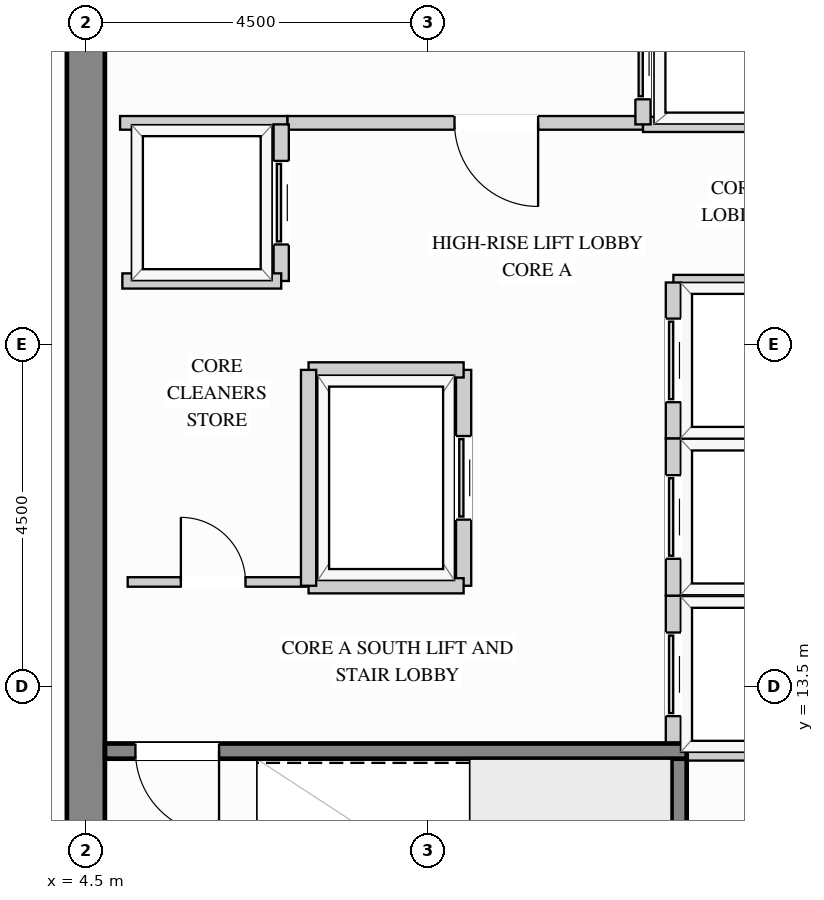
"""IFC4 building model, lengths in metres.
Left out: names, types, materials, properties, quantities, classifications, styles, units other than length and angle.
Written with IfcOpenShell. Run it as: python <this file> out.ifc"""

import sys

from ifc_helpers import new_model, si_unit, direction, frame, frame_2d, origin, place, context, subcontext, project, spatial, rectangle, extrude, source, transform, mapped, element, fill, save


model = new_model("IFC4")
c1 = context("Model", 3, precision=1e-05, world=origin(), true_north=direction((0.0, 1.0)))
c2 = subcontext(c1, "Body", "Model", "MODEL_VIEW")
j1 = project(units=[si_unit("LENGTHUNIT", "METRE"), si_unit("PLANEANGLEUNIT", "RADIAN")], contexts=[c1])
p1 = place(None, origin())
s1 = spatial("IfcSite", under=j1, at=p1, CompositionType="ELEMENT")
p2 = place(p1, origin())
s2 = spatial("IfcBuilding", under=s1, at=p2, CompositionType="ELEMENT")
p3 = place(p2, frame((0.0, 0.0, 223.2)))
s3 = spatial("IfcBuildingStorey", under=s2, at=p3, CompositionType="ELEMENT", Elevation=223.2)
m1 = source(origin(), c2, "Body", "SweptSolid", [
    extrude(rectangle(XDim=20.5, YDim=0.5, at=frame_2d((10.25, 0.0))), origin(), (0.0, 0.0, 1.0), 3.4),
])
p4 = place(p3, frame((4.5, 8.75, 0.0), z_axis=(0.0, 0.0, 1.0), x_axis=(0.0, 1.0, 0.0)))
e1 = element("IfcWall", 1, at=p4, inside=s3, PredefinedType="SHEAR", context=c2, shape_type="MappedRepresentation", body=[
    mapped(m1, transform((0.0, 0.0, 0.0), x_axis=(1.0, 0.0, 0.0), y_axis=(0.0, 1.0, 0.0), z_axis=(0.0, 0.0, 1.0))),
])
p5 = place(p3, frame((7.15, 20.92, 0.0), z_axis=(0.0, 0.0, 1.0), x_axis=(1.0, 0.0, 0.0)))
e2 = element("IfcWall", 2, at=p5, inside=s3, PredefinedType="PARTITIONING", context=c2, shape_type="SweptSolid", body=[
    extrude(rectangle(XDim=4.68, YDim=0.18, at=frame_2d((2.34, 0.0))), origin(), (0.0, 0.0, 1.0), 3.385),
])
p6 = place(p5, frame((2.2, 0.0, 0.0)))
e3 = element("IfcOpeningElement", 3, at=p6, cuts=e2, PredefinedType="OPENING", context=c2, shape_type="SweptSolid", body=[
    extrude(rectangle(XDim=1.1, YDim=2.15, at=frame_2d((0.55, 1.075))), frame((0.0, 0.1, 0.0), z_axis=(0.0, -1.0, 0.0), x_axis=(1.0, 0.0, 0.0)), (0.0, 0.0, 1.0), 0.2),
])
m2 = source(origin(), c2, "Body", "SweptSolid", [
    extrude(rectangle(XDim=2.2, YDim=0.18, at=frame_2d((1.1, 0.0))), origin(), (0.0, 0.0, 1.0), 3.385),
])
p7 = place(p3, frame((4.95, 20.92, 0.0), z_axis=(0.0, 0.0, 1.0), x_axis=(1.0, 0.0, 0.0)))
e4 = element("IfcWall", 4, at=p7, inside=s3, PredefinedType="PARTITIONING", context=c2, shape_type="MappedRepresentation", body=[
    mapped(m2, transform((0.0, 0.0, 0.0), x_axis=(1.0, 0.0, 0.0), y_axis=(0.0, 1.0, 0.0), z_axis=(0.0, 0.0, 1.0))),
])
p8 = place(p3, frame((5.05, 14.88, 0.0), z_axis=(0.0, 0.0, 1.0), x_axis=(1.0, 0.0, 0.0)))
e5 = element("IfcWall", 5, at=p8, inside=s3, PredefinedType="PARTITIONING", context=c2, shape_type="SweptSolid", body=[
    extrude(rectangle(XDim=2.35, YDim=0.125, at=frame_2d((1.175, 0.0))), origin(), (0.0, 0.0, 1.0), 3.385),
])
p9 = place(p8, frame((0.7, 0.0, 0.0)))
e6 = element("IfcOpeningElement", 6, at=p9, cuts=e5, PredefinedType="OPENING", context=c2, shape_type="SweptSolid", body=[
    extrude(rectangle(XDim=0.85, YDim=2.1, at=frame_2d((0.425, 1.05))), frame((0.0, 0.073, 0.0), z_axis=(0.0, -1.0, 0.0), x_axis=(1.0, 0.0, 0.0)), (0.0, 0.0, 1.0), 0.145),
])
m3 = source(origin(), c2, "Body", "SweptSolid", [
    extrude(rectangle(XDim=2.39, YDim=0.2, at=frame_2d((1.195, 0.0))), origin(), (0.0, 0.0, 1.0), 3.385),
])
p10 = place(p3, frame((11.83, 20.9, 0.0), z_axis=(0.0, 0.0, 1.0), x_axis=(1.0, 0.0, 0.0)))
e7 = element("IfcWall", 7, at=p10, inside=s3, PredefinedType="PARTITIONING", context=c2, shape_type="MappedRepresentation", body=[
    mapped(m3, transform((0.0, 0.0, 0.0), x_axis=(1.0, 0.0, 0.0), y_axis=(0.0, 1.0, 0.0), z_axis=(0.0, 0.0, 1.0))),
])
p11 = place(p3, frame((11.83, 20.9, 0.0), z_axis=(0.0, 0.0, 1.0), x_axis=(0.0, 1.0, 0.0)))
e8 = element("IfcWall", 8, at=p11, inside=s3, PredefinedType="PARTITIONING", context=c2, shape_type="SweptSolid", body=[
    extrude(rectangle(XDim=1.76, YDim=0.2, at=frame_2d((0.88, 0.0))), origin(), (0.0, 0.0, 1.0), 3.385),
])
p12 = place(p11, frame((0.33, 0.0, 0.0)))
e9 = element("IfcOpeningElement", 9, at=p12, cuts=e8, PredefinedType="OPENING", context=c2, shape_type="SweptSolid", body=[
    extrude(rectangle(XDim=1.1, YDim=2.2, at=frame_2d((0.55, 1.1))), frame((0.0, 0.11, 0.0), z_axis=(0.0, -1.0, 0.0), x_axis=(1.0, 0.0, 0.0)), (0.0, 0.0, 1.0), 0.22),
])
m4 = source(origin(), c2, "Body", "SweptSolid", [
    extrude(rectangle(XDim=1.99, YDim=0.2, at=frame_2d((0.995, 0.0))), origin(), (0.0, 0.0, 1.0), 3.385),
])
for number, where, z_axis, x_axis in (
    (10, (12.23, 14.7, 0.0), (0.0, 0.0, 1.0), (1.0, 0.0, 0.0)),
    (11, (12.23, 12.63, 0.0), (0.0, 0.0, 1.0), (1.0, 0.0, 0.0)),
):
    element("IfcWall", number, at=place(p3, frame(where, z_axis=z_axis, x_axis=x_axis)), inside=s3, PredefinedType="PARTITIONING", context=c2, shape_type="MappedRepresentation", body=[
        mapped(m4, transform((0.0, 0.0, 0.0), x_axis=(1.0, 0.0, 0.0), y_axis=(0.0, 1.0, 0.0), z_axis=(0.0, 0.0, 1.0))),
    ])
p13 = place(p3, frame((12.23, 12.63, 0.0), z_axis=(0.0, 0.0, 1.0), x_axis=(0.0, 1.0, 0.0)))
e12 = element("IfcWall", 12, at=p13, inside=s3, PredefinedType="PARTITIONING", context=c2, shape_type="SweptSolid", body=[
    extrude(rectangle(XDim=2.07, YDim=0.2, at=frame_2d((1.035, 0.0))), origin(), (0.0, 0.0, 1.0), 3.385),
])
p14 = place(p13, frame((0.485, 0.0, 0.0)))
e13 = element("IfcOpeningElement", 13, at=p14, cuts=e12, PredefinedType="OPENING", context=c2, shape_type="SweptSolid", body=[
    extrude(rectangle(XDim=1.1, YDim=2.2, at=frame_2d((0.55, 1.1))), frame((0.0, 0.11, 0.0), z_axis=(0.0, -1.0, 0.0), x_axis=(1.0, 0.0, 0.0)), (0.0, 0.0, 1.0), 0.22),
])
p15 = place(p3, frame((12.23, 16.77, 0.0), z_axis=(0.0, 0.0, 1.0), x_axis=(1.0, 0.0, 0.0)))
e14 = element("IfcWall", 14, at=p15, inside=s3, PredefinedType="PARTITIONING", context=c2, shape_type="MappedRepresentation", body=[
    mapped(m4, transform((0.0, 0.0, 0.0), x_axis=(1.0, 0.0, 0.0), y_axis=(0.0, 1.0, 0.0), z_axis=(0.0, 0.0, 1.0))),
])
p16 = place(p3, frame((12.23, 14.7, 0.0), z_axis=(0.0, 0.0, 1.0), x_axis=(0.0, 1.0, 0.0)))
e15 = element("IfcWall", 15, at=p16, inside=s3, PredefinedType="PARTITIONING", context=c2, shape_type="SweptSolid", body=[
    extrude(rectangle(XDim=2.07, YDim=0.2, at=frame_2d((1.035, 0.0))), origin(), (0.0, 0.0, 1.0), 3.385),
])
p17 = place(p16, frame((0.485, 0.0, 0.0)))
e16 = element("IfcOpeningElement", 16, at=p17, cuts=e15, PredefinedType="OPENING", context=c2, shape_type="SweptSolid", body=[
    extrude(rectangle(XDim=1.1, YDim=2.2, at=frame_2d((0.55, 1.1))), frame((0.0, 0.11, 0.0), z_axis=(0.0, -1.0, 0.0), x_axis=(1.0, 0.0, 0.0)), (0.0, 0.0, 1.0), 0.22),
])
p18 = place(p3, frame((12.23, 18.82, 0.0), z_axis=(0.0, 0.0, 1.0), x_axis=(1.0, 0.0, 0.0)))
e17 = element("IfcWall", 17, at=p18, inside=s3, PredefinedType="PARTITIONING", context=c2, shape_type="MappedRepresentation", body=[
    mapped(m4, transform((0.0, 0.0, 0.0), x_axis=(1.0, 0.0, 0.0), y_axis=(0.0, 1.0, 0.0), z_axis=(0.0, 0.0, 1.0))),
])
p19 = place(p3, frame((12.23, 16.77, 0.0), z_axis=(0.0, 0.0, 1.0), x_axis=(0.0, 1.0, 0.0)))
e18 = element("IfcWall", 18, at=p19, inside=s3, PredefinedType="PARTITIONING", context=c2, shape_type="SweptSolid", body=[
    extrude(rectangle(XDim=2.05, YDim=0.2, at=frame_2d((1.025, 0.0))), origin(), (0.0, 0.0, 1.0), 3.385),
])
p20 = place(p19, frame((0.475, 0.0, 0.0)))
e19 = element("IfcOpeningElement", 19, at=p20, cuts=e18, PredefinedType="OPENING", context=c2, shape_type="SweptSolid", body=[
    extrude(rectangle(XDim=1.1, YDim=2.2, at=frame_2d((0.55, 1.1))), frame((0.0, 0.11, 0.0), z_axis=(0.0, -1.0, 0.0), x_axis=(1.0, 0.0, 0.0)), (0.0, 0.0, 1.0), 0.22),
])
p21 = place(p3, frame((7.07, 18.84, 0.0), z_axis=(0.0, 0.0, 1.0), x_axis=(0.0, 1.0, 0.0)))
e20 = element("IfcWall", 20, at=p21, inside=s3, PredefinedType="PARTITIONING", context=c2, shape_type="SweptSolid", body=[
    extrude(rectangle(XDim=2.06, YDim=0.2, at=frame_2d((1.03, 0.0))), origin(), (0.0, 0.0, 1.0), 3.385),
])
p22 = place(p21, frame((0.48, 0.0, 0.0)))
e21 = element("IfcOpeningElement", 21, at=p22, cuts=e20, PredefinedType="OPENING", context=c2, shape_type="SweptSolid", body=[
    extrude(rectangle(XDim=1.1, YDim=2.2, at=frame_2d((0.55, 1.1))), frame((0.0, 0.11, 0.0), z_axis=(0.0, -1.0, 0.0), x_axis=(1.0, 0.0, 0.0)), (0.0, 0.0, 1.0), 0.22),
])
m5 = source(origin(), c2, "Body", "SweptSolid", [
    extrude(rectangle(XDim=2.09, YDim=0.2, at=frame_2d((1.045, 0.0))), origin(), (0.0, 0.0, 1.0), 3.385),
])
p23 = place(p3, frame((4.98, 18.84, 0.0), z_axis=(0.0, 0.0, 1.0), x_axis=(1.0, 0.0, 0.0)))
e22 = element("IfcWall", 22, at=p23, inside=s3, PredefinedType="PARTITIONING", context=c2, shape_type="MappedRepresentation", body=[
    mapped(m5, transform((0.0, 0.0, 0.0), x_axis=(1.0, 0.0, 0.0), y_axis=(0.0, 1.0, 0.0), z_axis=(0.0, 0.0, 1.0))),
])
p24 = place(p3, frame((9.47, 14.83, 0.0), z_axis=(0.0, 0.0, 1.0), x_axis=(0.0, 1.0, 0.0)))
e23 = element("IfcWall", 23, at=p24, inside=s3, PredefinedType="PARTITIONING", context=c2, shape_type="SweptSolid", body=[
    extrude(rectangle(XDim=2.84, YDim=0.2, at=frame_2d((1.42, 0.0))), origin(), (0.0, 0.0, 1.0), 3.385),
])
p25 = place(p24, frame((0.87, 0.0, 0.0)))
e24 = element("IfcOpeningElement", 24, at=p25, cuts=e23, PredefinedType="OPENING", context=c2, shape_type="SweptSolid", body=[
    extrude(rectangle(XDim=1.1, YDim=2.2, at=frame_2d((0.55, 1.1))), frame((0.0, 0.11, 0.0), z_axis=(0.0, -1.0, 0.0), x_axis=(1.0, 0.0, 0.0)), (0.0, 0.0, 1.0), 0.22),
])
m6 = source(origin(), c2, "Body", "SweptSolid", [
    extrude(rectangle(XDim=2.04, YDim=0.2, at=frame_2d((1.02, 0.0))), origin(), (0.0, 0.0, 1.0), 3.385),
])
for number, where, z_axis, x_axis in (
    (25, (7.43, 17.67, 0.0), (0.0, 0.0, 1.0), (1.0, 0.0, 0.0)),
    (26, (7.43, 14.83, 0.0), (0.0, 0.0, 1.0), (1.0, 0.0, 0.0)),
):
    element("IfcWall", number, at=place(p3, frame(where, z_axis=z_axis, x_axis=x_axis)), inside=s3, PredefinedType="PARTITIONING", context=c2, shape_type="MappedRepresentation", body=[
        mapped(m6, transform((0.0, 0.0, 0.0), x_axis=(1.0, 0.0, 0.0), y_axis=(0.0, 1.0, 0.0), z_axis=(0.0, 0.0, 1.0))),
    ])
m7 = source(origin(), c2, "Body", "SweptSolid", [
    extrude(rectangle(XDim=2.84, YDim=0.2, at=frame_2d((1.42, 0.0))), origin(), (0.0, 0.0, 1.0), 3.385),
])
p26 = place(p3, frame((7.43, 14.83, 0.0), z_axis=(0.0, 0.0, 1.0), x_axis=(0.0, 1.0, 0.0)))
e27 = element("IfcWall", 27, at=p26, inside=s3, PredefinedType="PARTITIONING", context=c2, shape_type="MappedRepresentation", body=[
    mapped(m7, transform((0.0, 0.0, 0.0), x_axis=(1.0, 0.0, 0.0), y_axis=(0.0, 1.0, 0.0), z_axis=(0.0, 0.0, 1.0))),
])
m8 = source(origin(), c2, "Body", "SweptSolid", [
    extrude(rectangle(XDim=3.803, YDim=0.2, at=frame_2d((1.901, 0.0))), origin(), (0.0, 0.0, 1.0), 3.4),
])
p27 = place(p3, frame((12.305, 8.752, 0.0), z_axis=(0.0, 0.0, 1.0), x_axis=(0.0, 1.0, 0.0)))
e28 = element("IfcWall", 28, at=p27, inside=s3, PredefinedType="SHEAR", context=c2, shape_type="MappedRepresentation", body=[
    mapped(m8, transform((0.0, 0.0, 0.0), x_axis=(1.0, 0.0, 0.0), y_axis=(0.0, 1.0, 0.0), z_axis=(0.0, 0.0, 1.0))),
])
p28 = place(p3, frame((4.752, 12.655, 0.0), z_axis=(0.0, 0.0, 1.0), x_axis=(1.0, 0.0, 0.0)))
e29 = element("IfcWall", 29, at=p28, inside=s3, PredefinedType="SHEAR", context=c2, shape_type="SweptSolid", body=[
    extrude(rectangle(XDim=7.653, YDim=0.2, at=frame_2d((3.827, 0.0))), origin(), (0.0, 0.0, 1.0), 3.4),
])
p29 = place(p28, frame((0.4, 0.0, 0.0)))
e30 = element("IfcOpeningElement", 30, at=p29, cuts=e29, PredefinedType="OPENING", context=c2, shape_type="SweptSolid", body=[
    extrude(rectangle(XDim=1.1, YDim=2.15, at=frame_2d((0.55, 1.075))), frame((0.0, 0.11, 0.0), z_axis=(0.0, -1.0, 0.0), x_axis=(1.0, 0.0, 0.0)), (0.0, 0.0, 1.0), 0.22),
])
m9 = source(origin(), c2, "Body", "SweptSolid", [
    extrude(rectangle(XDim=1.1, YDim=2.15, at=frame_2d((0.55, 1.075))), frame((0.0, 0.025, 0.0), z_axis=(0.0, -1.0, 0.0), x_axis=(1.0, 0.0, 0.0)), (0.0, 0.0, 1.0), 0.05),
])
p30 = place(p6, origin())
e31 = element("IfcDoor", 31, at=p30, inside=s3, OperationType="SINGLE_SWING_RIGHT", PredefinedType="DOOR", context=c2, shape_type="MappedRepresentation", body=[
    mapped(m9, transform((0.0, 0.0, 0.0), x_axis=(1.0, 0.0, 0.0), y_axis=(0.0, 1.0, 0.0), z_axis=(0.0, 0.0, 1.0))),
])
fill(e3, e31)
m10 = source(origin(), c2, "Body", "SweptSolid", [
    extrude(rectangle(XDim=1.1, YDim=2.2, at=frame_2d((0.55, 1.1))), frame((0.0, 0.025, 0.0), z_axis=(0.0, -1.0, 0.0), x_axis=(1.0, 0.0, 0.0)), (0.0, 0.0, 1.0), 0.05),
])
p31 = place(p12, origin())
e32 = element("IfcDoor", 32, at=p31, inside=s3, OperationType="SLIDING_TO_LEFT", PredefinedType="DOOR", context=c2, shape_type="MappedRepresentation", body=[
    mapped(m10, transform((0.0, 0.0, 0.0), x_axis=(1.0, 0.0, 0.0), y_axis=(0.0, 1.0, 0.0), z_axis=(0.0, 0.0, 1.0))),
])
fill(e9, e32)
p32 = place(p14, origin())
e33 = element("IfcDoor", 33, at=p32, inside=s3, OperationType="SLIDING_TO_LEFT", PredefinedType="DOOR", context=c2, shape_type="MappedRepresentation", body=[
    mapped(m10, transform((0.0, 0.0, 0.0), x_axis=(1.0, 0.0, 0.0), y_axis=(0.0, 1.0, 0.0), z_axis=(0.0, 0.0, 1.0))),
])
fill(e13, e33)
p33 = place(p17, origin())
e34 = element("IfcDoor", 34, at=p33, inside=s3, OperationType="SLIDING_TO_LEFT", PredefinedType="DOOR", context=c2, shape_type="MappedRepresentation", body=[
    mapped(m10, transform((0.0, 0.0, 0.0), x_axis=(1.0, 0.0, 0.0), y_axis=(0.0, 1.0, 0.0), z_axis=(0.0, 0.0, 1.0))),
])
fill(e16, e34)
p34 = place(p20, origin())
e35 = element("IfcDoor", 35, at=p34, inside=s3, OperationType="SLIDING_TO_LEFT", PredefinedType="DOOR", context=c2, shape_type="MappedRepresentation", body=[
    mapped(m10, transform((0.0, 0.0, 0.0), x_axis=(1.0, 0.0, 0.0), y_axis=(0.0, 1.0, 0.0), z_axis=(0.0, 0.0, 1.0))),
])
fill(e19, e35)
p35 = place(p22, origin())
e36 = element("IfcDoor", 36, at=p35, inside=s3, OperationType="SLIDING_TO_LEFT", PredefinedType="DOOR", context=c2, shape_type="MappedRepresentation", body=[
    mapped(m10, transform((0.0, 0.0, 0.0), x_axis=(1.0, 0.0, 0.0), y_axis=(0.0, 1.0, 0.0), z_axis=(0.0, 0.0, 1.0))),
])
fill(e21, e36)
p36 = place(p25, origin())
e37 = element("IfcDoor", 37, at=p36, inside=s3, OperationType="SLIDING_TO_LEFT", PredefinedType="DOOR", context=c2, shape_type="MappedRepresentation", body=[
    mapped(m10, transform((0.0, 0.0, 0.0), x_axis=(1.0, 0.0, 0.0), y_axis=(0.0, 1.0, 0.0), z_axis=(0.0, 0.0, 1.0))),
])
fill(e24, e37)
m11 = source(origin(), c2, "Body", "SweptSolid", [
    extrude(rectangle(XDim=0.85, YDim=2.1, at=frame_2d((0.425, 1.05))), frame((0.0, 0.025, 0.0), z_axis=(0.0, -1.0, 0.0), x_axis=(1.0, 0.0, 0.0)), (0.0, 0.0, 1.0), 0.05),
])
p37 = place(p9, origin())
e38 = element("IfcDoor", 38, at=p37, inside=s3, OperationType="SINGLE_SWING_LEFT", PredefinedType="DOOR", context=c2, shape_type="MappedRepresentation", body=[
    mapped(m11, transform((0.0, 0.0, 0.0), x_axis=(1.0, 0.0, 0.0), y_axis=(0.0, 1.0, 0.0), z_axis=(0.0, 0.0, 1.0))),
])
fill(e6, e38)
m12 = source(origin(), c2, "Body", "SweptSolid", [
    extrude(rectangle(XDim=1.1, YDim=2.15, at=frame_2d((0.55, 1.075))), frame((0.0, 0.025, 0.0), z_axis=(0.0, -1.0, 0.0), x_axis=(1.0, 0.0, 0.0)), (0.0, 0.0, 1.0), 0.05),
])
p38 = place(p29, origin())
e39 = element("IfcDoor", 39, at=p38, inside=s3, OperationType="SINGLE_SWING_RIGHT", PredefinedType="DOOR", context=c2, shape_type="MappedRepresentation", body=[
    mapped(m12, transform((0.0, 0.0, 0.0), x_axis=(1.0, 0.0, 0.0), y_axis=(0.0, 1.0, 0.0), z_axis=(0.0, 0.0, 1.0))),
])
fill(e30, e39)
save(model, sys.argv[1])
